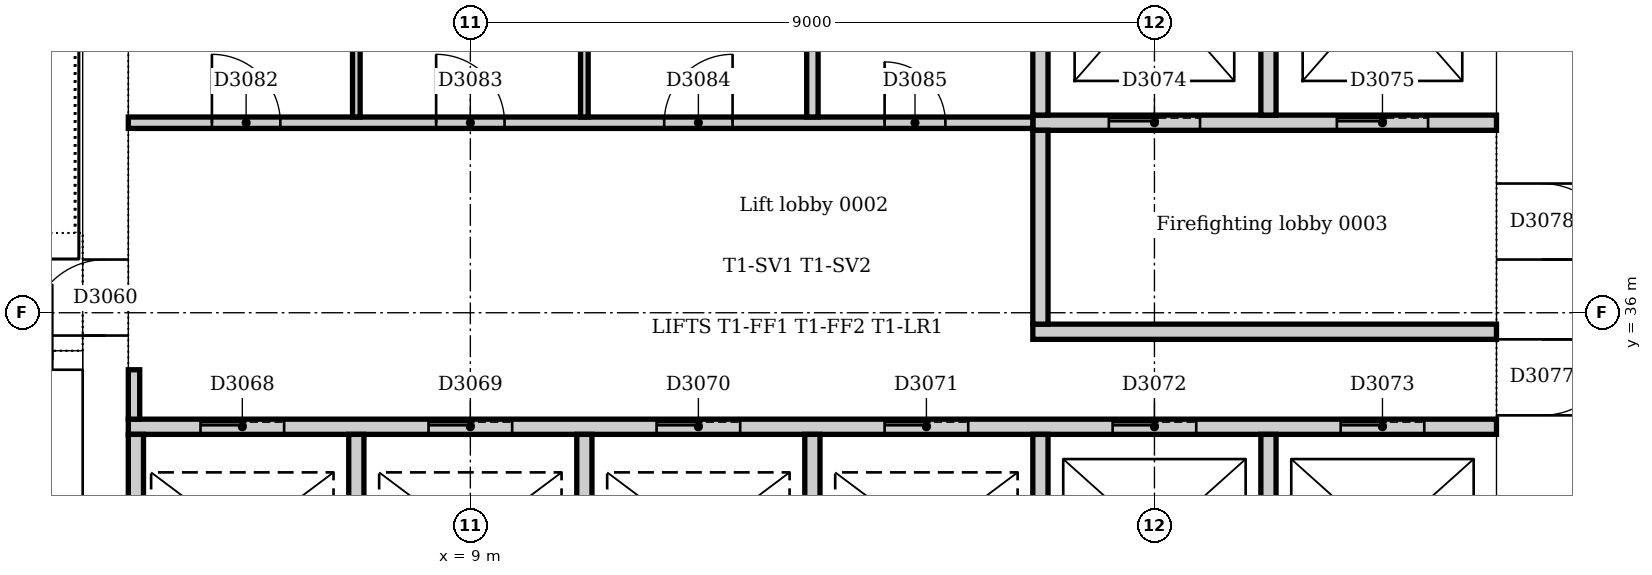
"""IFC4 building model, lengths in metres.
Left out: names, types, materials, properties, quantities, classifications, styles, units other than length and angle.
Written with IfcOpenShell. Run it as: python <this file> out.ifc"""

import sys

from ifc_helpers import new_model, si_unit, direction, frame, frame_2d, origin, place, context, subcontext, project, spatial, rectangle, extrude, element, fill, save


model = new_model("IFC4")
c1 = context("Model", 3, precision=1e-05, world=origin(), true_north=direction((0.0, 1.0)))
c2 = subcontext(c1, "Body", "Model", "MODEL_VIEW")
j1 = project(units=[si_unit("LENGTHUNIT", "METRE"), si_unit("PLANEANGLEUNIT", "RADIAN")], contexts=[c1])
p1 = place(None, origin())
s1 = spatial("IfcSite", under=j1, at=p1, CompositionType="ELEMENT")
p2 = place(p1, origin())
s2 = spatial("IfcBuilding", under=s1, at=p2, CompositionType="ELEMENT")
p3 = place(p2, origin())
s3 = spatial("IfcBuildingStorey", under=s2, at=p3, CompositionType="ELEMENT", Elevation=0.0)
p4 = place(p3, frame((23.1, 31.5, 0.0), z_axis=(0.0, 0.0, 1.0), x_axis=(0.0, 1.0, 0.0)))
e1 = element("IfcWall", 1, at=p4, inside=s3, PredefinedType="SOLIDWALL", context=c2, shape_type="SweptSolid", body=[
    extrude(rectangle(XDim=10.5, YDim=1.2, at=frame_2d((5.25, 0.0))), origin(), (0.0, 0.0, 1.0), 6.0),
])
p5 = place(p4, frame((3.15, 0.0, 0.0)))
e2 = element("IfcOpeningElement", 2, at=p5, cuts=e1, PredefinedType="OPENING", context=c2, shape_type="SweptSolid", body=[
    extrude(rectangle(XDim=1.0, YDim=2.1, at=frame_2d((0.5, 1.05))), frame((0.0, 0.61, 0.0), z_axis=(0.0, -1.0, 0.0), x_axis=(1.0, 0.0, 0.0)), (0.0, 0.0, 1.0), 1.22),
])
p6 = place(p4, frame((5.2, 0.0, 0.0)))
e3 = element("IfcOpeningElement", 3, at=p6, cuts=e1, PredefinedType="OPENING", context=c2, shape_type="SweptSolid", body=[
    extrude(rectangle(XDim=1.0, YDim=2.1, at=frame_2d((0.5, 1.05))), frame((0.0, 0.61, 0.0), z_axis=(0.0, -1.0, 0.0), x_axis=(1.0, 0.0, 0.0)), (0.0, 0.0, 1.0), 1.22),
])
p7 = place(p3, frame((4.2, 42.0, 0.0), z_axis=(0.0, 0.0, 1.0), x_axis=(0.0, -1.0, 0.0)))
e4 = element("IfcWall", 4, at=p7, inside=s3, PredefinedType="SOLIDWALL", context=c2, shape_type="SweptSolid", body=[
    extrude(rectangle(XDim=10.5, YDim=0.6, at=frame_2d((5.25, 0.0))), origin(), (0.0, 0.0, 1.0), 6.0),
])
p8 = place(p7, frame((5.3, 0.0, 0.0)))
e5 = element("IfcOpeningElement", 5, at=p8, cuts=e4, PredefinedType="OPENING", context=c2, shape_type="SweptSolid", body=[
    extrude(rectangle(XDim=1.0, YDim=2.1, at=frame_2d((0.5, 1.05))), frame((0.0, 0.31, 0.0), z_axis=(0.0, -1.0, 0.0), x_axis=(1.0, 0.0, 0.0)), (0.0, 0.0, 1.0), 0.62),
])
p9 = place(p3, frame((0.36, 35.375, 0.0), z_axis=(0.0, 0.0, 1.0), x_axis=(1.0, 0.0, 0.0)))
e6 = element("IfcWall", 6, at=p9, inside=s3, PredefinedType="SOLIDWALL", context=c2, shape_type="SweptSolid", body=[
    extrude(rectangle(XDim=3.54, YDim=0.25, at=frame_2d((1.77, 0.0))), origin(), (0.0, 0.0, 1.0), 6.0),
])
p10 = place(p9, frame((2.14, 0.0, 0.0)))
e7 = element("IfcOpeningElement", 7, at=p10, cuts=e6, PredefinedType="OPENING", context=c2, shape_type="SweptSolid", body=[
    extrude(rectangle(XDim=1.0, YDim=2.1, at=frame_2d((0.5, 1.05))), frame((0.0, 0.135, 0.0), z_axis=(0.0, -1.0, 0.0), x_axis=(1.0, 0.0, 0.0)), (0.0, 0.0, 1.0), 0.27),
])
p11 = place(p3, frame((16.4, 35.75, 0.0), z_axis=(0.0, 0.0, 1.0), x_axis=(1.0, 0.0, 0.0)))
e8 = element("IfcWall", 8, at=p11, inside=s3, PredefinedType="PARTITIONING", context=c2, shape_type="SweptSolid", body=[
    extrude(rectangle(XDim=6.1, YDim=0.2, at=frame_2d((3.05, 0.0))), origin(), (0.0, 0.0, 1.0), 5.7),
])
p12 = place(p3, frame((16.4, 38.5, 0.0), z_axis=(0.0, 0.0, 1.0), x_axis=(1.0, 0.0, 0.0)))
e9 = element("IfcWall", 9, at=p12, inside=s3, PredefinedType="PARTITIONING", context=c2, shape_type="SweptSolid", body=[
    extrude(rectangle(XDim=6.1, YDim=0.2, at=frame_2d((3.05, 0.0))), origin(), (0.0, 0.0, 1.0), 5.7),
])
p13 = place(p12, frame((1.0, 0.0, 0.0)))
e10 = element("IfcOpeningElement", 10, at=p13, cuts=e9, PredefinedType="OPENING", context=c2, shape_type="SweptSolid", body=[
    extrude(rectangle(XDim=1.2, YDim=2.1, at=frame_2d((0.6, 1.05))), frame((0.0, 0.11, 0.0), z_axis=(0.0, -1.0, 0.0), x_axis=(1.0, 0.0, 0.0)), (0.0, 0.0, 1.0), 0.22),
])
p14 = place(p12, frame((4.0, 0.0, 0.0)))
e11 = element("IfcOpeningElement", 11, at=p14, cuts=e9, PredefinedType="OPENING", context=c2, shape_type="SweptSolid", body=[
    extrude(rectangle(XDim=1.2, YDim=2.1, at=frame_2d((0.6, 1.05))), frame((0.0, 0.11, 0.0), z_axis=(0.0, -1.0, 0.0), x_axis=(1.0, 0.0, 0.0)), (0.0, 0.0, 1.0), 0.22),
])
p15 = place(p3, frame((16.5, 35.85, 0.0), z_axis=(0.0, 0.0, 1.0), x_axis=(0.0, 1.0, 0.0)))
e12 = element("IfcWall", 12, at=p15, inside=s3, PredefinedType="PARTITIONING", context=c2, shape_type="SweptSolid", body=[
    extrude(rectangle(XDim=2.55, YDim=0.2, at=frame_2d((1.275, 0.0))), origin(), (0.0, 0.0, 1.0), 5.7),
])
p16 = place(p3, frame((4.5, 34.5, 0.0), z_axis=(0.0, 0.0, 1.0), x_axis=(1.0, 0.0, 0.0)))
e13 = element("IfcWall", 13, at=p16, inside=s3, PredefinedType="PARTITIONING", context=c2, shape_type="SweptSolid", body=[
    extrude(rectangle(XDim=18.0, YDim=0.2, at=frame_2d((9.0, 0.0))), origin(), (0.0, 0.0, 1.0), 5.7),
])
p17 = place(p16, frame((0.95, 0.0, 0.0)))
e14 = element("IfcOpeningElement", 14, at=p17, cuts=e13, PredefinedType="OPENING", context=c2, shape_type="SweptSolid", body=[
    extrude(rectangle(XDim=1.1, YDim=2.1, at=frame_2d((0.55, 1.05))), frame((0.0, 0.11, 0.0), z_axis=(0.0, -1.0, 0.0), x_axis=(1.0, 0.0, 0.0)), (0.0, 0.0, 1.0), 0.22),
])
p18 = place(p16, frame((3.95, 0.0, 0.0)))
e15 = element("IfcOpeningElement", 15, at=p18, cuts=e13, PredefinedType="OPENING", context=c2, shape_type="SweptSolid", body=[
    extrude(rectangle(XDim=1.1, YDim=2.1, at=frame_2d((0.55, 1.05))), frame((0.0, 0.11, 0.0), z_axis=(0.0, -1.0, 0.0), x_axis=(1.0, 0.0, 0.0)), (0.0, 0.0, 1.0), 0.22),
])
p19 = place(p16, frame((6.95, 0.0, 0.0)))
e16 = element("IfcOpeningElement", 16, at=p19, cuts=e13, PredefinedType="OPENING", context=c2, shape_type="SweptSolid", body=[
    extrude(rectangle(XDim=1.1, YDim=2.1, at=frame_2d((0.55, 1.05))), frame((0.0, 0.11, 0.0), z_axis=(0.0, -1.0, 0.0), x_axis=(1.0, 0.0, 0.0)), (0.0, 0.0, 1.0), 0.22),
])
p20 = place(p16, frame((9.95, 0.0, 0.0)))
e17 = element("IfcOpeningElement", 17, at=p20, cuts=e13, PredefinedType="OPENING", context=c2, shape_type="SweptSolid", body=[
    extrude(rectangle(XDim=1.1, YDim=2.1, at=frame_2d((0.55, 1.05))), frame((0.0, 0.11, 0.0), z_axis=(0.0, -1.0, 0.0), x_axis=(1.0, 0.0, 0.0)), (0.0, 0.0, 1.0), 0.22),
])
p21 = place(p16, frame((12.95, 0.0, 0.0)))
e18 = element("IfcOpeningElement", 18, at=p21, cuts=e13, PredefinedType="OPENING", context=c2, shape_type="SweptSolid", body=[
    extrude(rectangle(XDim=1.1, YDim=2.1, at=frame_2d((0.55, 1.05))), frame((0.0, 0.11, 0.0), z_axis=(0.0, -1.0, 0.0), x_axis=(1.0, 0.0, 0.0)), (0.0, 0.0, 1.0), 0.22),
])
p22 = place(p16, frame((15.95, 0.0, 0.0)))
e19 = element("IfcOpeningElement", 19, at=p22, cuts=e13, PredefinedType="OPENING", context=c2, shape_type="SweptSolid", body=[
    extrude(rectangle(XDim=1.1, YDim=2.1, at=frame_2d((0.55, 1.05))), frame((0.0, 0.11, 0.0), z_axis=(0.0, -1.0, 0.0), x_axis=(1.0, 0.0, 0.0)), (0.0, 0.0, 1.0), 0.22),
])
for number, where, z_axis, x_axis in (
    (20, (16.5, 38.6, 0.0), (0.0, 0.0, 1.0), (0.0, 1.0, 0.0)),
    (21, (19.5, 38.6, 0.0), (0.0, 0.0, 1.0), (0.0, 1.0, 0.0)),
):
    element("IfcWall", number, at=place(p3, frame(where, z_axis=z_axis, x_axis=x_axis)), inside=s3, PredefinedType="PARTITIONING", context=c2, shape_type="SweptSolid", body=[
        extrude(rectangle(XDim=3.4, YDim=0.2, at=frame_2d((1.7, 0.0))), origin(), (0.0, 0.0, 1.0), 5.7),
    ])
for number, where, z_axis, x_axis in (
    (22, (4.6, 31.75, 0.0), (0.0, 0.0, 1.0), (0.0, 1.0, 0.0)),
    (23, (7.5, 31.75, 0.0), (0.0, 0.0, 1.0), (0.0, 1.0, 0.0)),
    (24, (10.5, 31.75, 0.0), (0.0, 0.0, 1.0), (0.0, 1.0, 0.0)),
    (25, (13.5, 31.75, 0.0), (0.0, 0.0, 1.0), (0.0, 1.0, 0.0)),
    (26, (16.5, 31.75, 0.0), (0.0, 0.0, 1.0), (0.0, 1.0, 0.0)),
    (27, (19.5, 31.75, 0.0), (0.0, 0.0, 1.0), (0.0, 1.0, 0.0)),
):
    element("IfcWall", number, at=place(p3, frame(where, z_axis=z_axis, x_axis=x_axis)), inside=s3, PredefinedType="PARTITIONING", context=c2, shape_type="SweptSolid", body=[
        extrude(rectangle(XDim=2.65, YDim=0.2, at=frame_2d((1.325, 0.0))), origin(), (0.0, 0.0, 1.0), 5.7),
    ])
p23 = place(p3, frame((4.5, 38.5, 0.0), z_axis=(0.0, 0.0, 1.0), x_axis=(1.0, 0.0, 0.0)))
e28 = element("IfcWall", 28, at=p23, inside=s3, PredefinedType="PARTITIONING", context=c2, shape_type="SweptSolid", body=[
    extrude(rectangle(XDim=11.9, YDim=0.15, at=frame_2d((5.95, 0.0))), origin(), (0.0, 0.0, 1.0), 5.7),
])
p24 = place(p23, frame((1.1, 0.0, 0.0)))
e29 = element("IfcOpeningElement", 29, at=p24, cuts=e28, PredefinedType="OPENING", context=c2, shape_type="SweptSolid", body=[
    extrude(rectangle(XDim=0.9, YDim=2.1, at=frame_2d((0.45, 1.05))), frame((0.0, 0.085, 0.0), z_axis=(0.0, -1.0, 0.0), x_axis=(1.0, 0.0, 0.0)), (0.0, 0.0, 1.0), 0.17),
])
p25 = place(p23, frame((4.05, 0.0, 0.0)))
e30 = element("IfcOpeningElement", 30, at=p25, cuts=e28, PredefinedType="OPENING", context=c2, shape_type="SweptSolid", body=[
    extrude(rectangle(XDim=0.9, YDim=2.1, at=frame_2d((0.45, 1.05))), frame((0.0, 0.085, 0.0), z_axis=(0.0, -1.0, 0.0), x_axis=(1.0, 0.0, 0.0)), (0.0, 0.0, 1.0), 0.17),
])
p26 = place(p23, frame((7.05, 0.0, 0.0)))
e31 = element("IfcOpeningElement", 31, at=p26, cuts=e28, PredefinedType="OPENING", context=c2, shape_type="SweptSolid", body=[
    extrude(rectangle(XDim=0.9, YDim=2.1, at=frame_2d((0.45, 1.05))), frame((0.0, 0.085, 0.0), z_axis=(0.0, -1.0, 0.0), x_axis=(1.0, 0.0, 0.0)), (0.0, 0.0, 1.0), 0.17),
])
p27 = place(p23, frame((9.95, 0.0, 0.0)))
e32 = element("IfcOpeningElement", 32, at=p27, cuts=e28, PredefinedType="OPENING", context=c2, shape_type="SweptSolid", body=[
    extrude(rectangle(XDim=0.8, YDim=2.1, at=frame_2d((0.4, 1.05))), frame((0.0, 0.085, 0.0), z_axis=(0.0, -1.0, 0.0), x_axis=(1.0, 0.0, 0.0)), (0.0, 0.0, 1.0), 0.17),
])
p28 = place(p3, frame((4.575, 34.6, 0.0), z_axis=(0.0, 0.0, 1.0), x_axis=(0.0, 1.0, 0.0)))
e33 = element("IfcWall", 33, at=p28, inside=s3, PredefinedType="PARTITIONING", context=c2, shape_type="SweptSolid", body=[
    extrude(rectangle(XDim=0.65, YDim=0.15, at=frame_2d((0.325, 0.0))), origin(), (0.0, 0.0, 1.0), 5.7),
])
p29 = place(p3, frame((13.5, 38.575, 0.0), z_axis=(0.0, 0.0, 1.0), x_axis=(0.0, 1.0, 0.0)))
e34 = element("IfcWall", 34, at=p29, inside=s3, PredefinedType="PARTITIONING", context=c2, shape_type="SweptSolid", body=[
    extrude(rectangle(XDim=3.425, YDim=0.15, at=frame_2d((1.712, 0.0))), origin(), (0.0, 0.0, 1.0), 5.7),
])
for number, where, z_axis, x_axis in (
    (35, (7.5, 38.575, 0.0), (0.0, 0.0, 1.0), (0.0, 1.0, 0.0)),
    (36, (10.5, 38.575, 0.0), (0.0, 0.0, 1.0), (0.0, 1.0, 0.0)),
):
    element("IfcWall", number, at=place(p3, frame(where, z_axis=z_axis, x_axis=x_axis)), inside=s3, PredefinedType="PARTITIONING", context=c2, shape_type="SweptSolid", body=[
        extrude(rectangle(XDim=3.425, YDim=0.1, at=frame_2d((1.712, 0.0))), origin(), (0.0, 0.0, 1.0), 5.7),
    ])
p30 = place(p8, frame((1.0, 0.0, 0.0), z_axis=(0.0, 0.0, 1.0), x_axis=(-1.0, 0.0, 0.0)))
e37 = element("IfcDoor", 37, at=p30, inside=s3, OperationType="SINGLE_SWING_LEFT", PredefinedType="DOOR", context=c2, shape_type="SweptSolid", body=[
    extrude(rectangle(XDim=1.0, YDim=2.1, at=frame_2d((0.5, 1.05))), frame((0.0, 0.025, 0.0), z_axis=(0.0, -1.0, 0.0), x_axis=(1.0, 0.0, 0.0)), (0.0, 0.0, 1.0), 0.05),
])
fill(e5, e37)
p31 = place(p17, origin())
e38 = element("IfcDoor", 38, at=p31, inside=s3, OperationType="SLIDING_TO_LEFT", PredefinedType="DOOR", context=c2, shape_type="SweptSolid", body=[
    extrude(rectangle(XDim=1.1, YDim=2.1, at=frame_2d((0.55, 1.05))), frame((0.0, 0.025, 0.0), z_axis=(0.0, -1.0, 0.0), x_axis=(1.0, 0.0, 0.0)), (0.0, 0.0, 1.0), 0.05),
])
fill(e14, e38)
p32 = place(p18, origin())
e39 = element("IfcDoor", 39, at=p32, inside=s3, OperationType="SLIDING_TO_LEFT", PredefinedType="DOOR", context=c2, shape_type="SweptSolid", body=[
    extrude(rectangle(XDim=1.1, YDim=2.1, at=frame_2d((0.55, 1.05))), frame((0.0, 0.025, 0.0), z_axis=(0.0, -1.0, 0.0), x_axis=(1.0, 0.0, 0.0)), (0.0, 0.0, 1.0), 0.05),
])
fill(e15, e39)
p33 = place(p19, origin())
e40 = element("IfcDoor", 40, at=p33, inside=s3, OperationType="SLIDING_TO_LEFT", PredefinedType="DOOR", context=c2, shape_type="SweptSolid", body=[
    extrude(rectangle(XDim=1.1, YDim=2.1, at=frame_2d((0.55, 1.05))), frame((0.0, 0.025, 0.0), z_axis=(0.0, -1.0, 0.0), x_axis=(1.0, 0.0, 0.0)), (0.0, 0.0, 1.0), 0.05),
])
fill(e16, e40)
p34 = place(p20, origin())
e41 = element("IfcDoor", 41, at=p34, inside=s3, OperationType="SLIDING_TO_LEFT", PredefinedType="DOOR", context=c2, shape_type="SweptSolid", body=[
    extrude(rectangle(XDim=1.1, YDim=2.1, at=frame_2d((0.55, 1.05))), frame((0.0, 0.025, 0.0), z_axis=(0.0, -1.0, 0.0), x_axis=(1.0, 0.0, 0.0)), (0.0, 0.0, 1.0), 0.05),
])
fill(e17, e41)
p35 = place(p21, origin())
e42 = element("IfcDoor", 42, at=p35, inside=s3, OperationType="SLIDING_TO_LEFT", PredefinedType="DOOR", context=c2, shape_type="SweptSolid", body=[
    extrude(rectangle(XDim=1.1, YDim=2.1, at=frame_2d((0.55, 1.05))), frame((0.0, 0.025, 0.0), z_axis=(0.0, -1.0, 0.0), x_axis=(1.0, 0.0, 0.0)), (0.0, 0.0, 1.0), 0.05),
])
fill(e18, e42)
p36 = place(p22, origin())
e43 = element("IfcDoor", 43, at=p36, inside=s3, OperationType="SLIDING_TO_LEFT", PredefinedType="DOOR", context=c2, shape_type="SweptSolid", body=[
    extrude(rectangle(XDim=1.1, YDim=2.1, at=frame_2d((0.55, 1.05))), frame((0.0, 0.025, 0.0), z_axis=(0.0, -1.0, 0.0), x_axis=(1.0, 0.0, 0.0)), (0.0, 0.0, 1.0), 0.05),
])
fill(e19, e43)
p37 = place(p13, origin())
e44 = element("IfcDoor", 44, at=p37, inside=s3, OperationType="SLIDING_TO_LEFT", PredefinedType="DOOR", context=c2, shape_type="SweptSolid", body=[
    extrude(rectangle(XDim=1.2, YDim=2.1, at=frame_2d((0.6, 1.05))), frame((0.0, 0.025, 0.0), z_axis=(0.0, -1.0, 0.0), x_axis=(1.0, 0.0, 0.0)), (0.0, 0.0, 1.0), 0.05),
])
fill(e10, e44)
p38 = place(p14, origin())
e45 = element("IfcDoor", 45, at=p38, inside=s3, OperationType="SLIDING_TO_LEFT", PredefinedType="DOOR", context=c2, shape_type="SweptSolid", body=[
    extrude(rectangle(XDim=1.2, YDim=2.1, at=frame_2d((0.6, 1.05))), frame((0.0, 0.025, 0.0), z_axis=(0.0, -1.0, 0.0), x_axis=(1.0, 0.0, 0.0)), (0.0, 0.0, 1.0), 0.05),
])
fill(e11, e45)
p39 = place(p5, frame((1.0, 0.0, 0.0), z_axis=(0.0, 0.0, 1.0), x_axis=(-1.0, 0.0, 0.0)))
e46 = element("IfcDoor", 46, at=p39, inside=s3, OperationType="SINGLE_SWING_LEFT", PredefinedType="DOOR", context=c2, shape_type="SweptSolid", body=[
    extrude(rectangle(XDim=1.0, YDim=2.1, at=frame_2d((0.5, 1.05))), frame((0.0, 0.025, 0.0), z_axis=(0.0, -1.0, 0.0), x_axis=(1.0, 0.0, 0.0)), (0.0, 0.0, 1.0), 0.05),
])
fill(e2, e46)
p40 = place(p6, frame((1.0, 0.0, 0.0), z_axis=(0.0, 0.0, 1.0), x_axis=(-1.0, 0.0, 0.0)))
e47 = element("IfcDoor", 47, at=p40, inside=s3, OperationType="SINGLE_SWING_RIGHT", PredefinedType="DOOR", context=c2, shape_type="SweptSolid", body=[
    extrude(rectangle(XDim=1.0, YDim=2.1, at=frame_2d((0.5, 1.05))), frame((0.0, 0.025, 0.0), z_axis=(0.0, -1.0, 0.0), x_axis=(1.0, 0.0, 0.0)), (0.0, 0.0, 1.0), 0.05),
])
fill(e3, e47)
p41 = place(p24, origin())
e48 = element("IfcDoor", 48, at=p41, inside=s3, OperationType="SINGLE_SWING_LEFT", PredefinedType="DOOR", context=c2, shape_type="SweptSolid", body=[
    extrude(rectangle(XDim=0.9, YDim=2.1, at=frame_2d((0.45, 1.05))), frame((0.0, 0.025, 0.0), z_axis=(0.0, -1.0, 0.0), x_axis=(1.0, 0.0, 0.0)), (0.0, 0.0, 1.0), 0.05),
])
fill(e29, e48)
p42 = place(p25, origin())
e49 = element("IfcDoor", 49, at=p42, inside=s3, OperationType="SINGLE_SWING_LEFT", PredefinedType="DOOR", context=c2, shape_type="SweptSolid", body=[
    extrude(rectangle(XDim=0.9, YDim=2.1, at=frame_2d((0.45, 1.05))), frame((0.0, 0.025, 0.0), z_axis=(0.0, -1.0, 0.0), x_axis=(1.0, 0.0, 0.0)), (0.0, 0.0, 1.0), 0.05),
])
fill(e30, e49)
p43 = place(p26, origin())
e50 = element("IfcDoor", 50, at=p43, inside=s3, OperationType="SINGLE_SWING_RIGHT", PredefinedType="DOOR", context=c2, shape_type="SweptSolid", body=[
    extrude(rectangle(XDim=0.9, YDim=2.1, at=frame_2d((0.45, 1.05))), frame((0.0, 0.025, 0.0), z_axis=(0.0, -1.0, 0.0), x_axis=(1.0, 0.0, 0.0)), (0.0, 0.0, 1.0), 0.05),
])
fill(e31, e50)
p44 = place(p27, origin())
e51 = element("IfcDoor", 51, at=p44, inside=s3, OperationType="SINGLE_SWING_LEFT", PredefinedType="DOOR", context=c2, shape_type="SweptSolid", body=[
    extrude(rectangle(XDim=0.8, YDim=2.1, at=frame_2d((0.4, 1.05))), frame((0.0, 0.025, 0.0), z_axis=(0.0, -1.0, 0.0), x_axis=(1.0, 0.0, 0.0)), (0.0, 0.0, 1.0), 0.05),
])
fill(e32, e51)
save(model, sys.argv[1])
